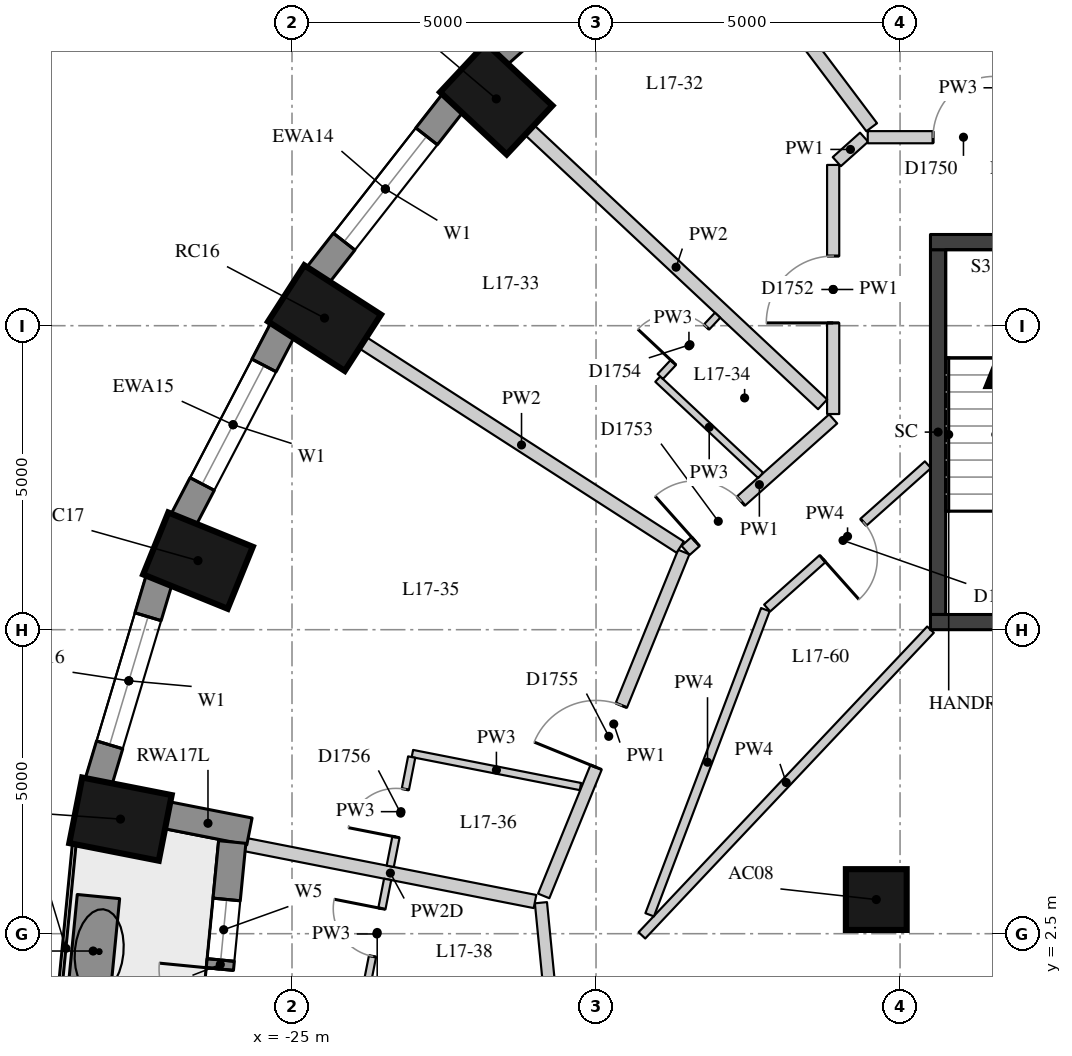
"""IFC4 building model, lengths in metres.
Left out: names, types, materials, properties, quantities, classifications, styles, units other than length and angle.
Written with IfcOpenShell. Run it as: python <this file> out.ifc"""

import sys

from ifc_helpers import new_model, si_unit, direction, frame, frame_2d, origin, origin_2d, place, context, subcontext, project, spatial, rectangle, extrude, element, fill, save


model = new_model("IFC4")
c1 = context("Model", 3, precision=1e-05, world=origin(), true_north=direction((0.0, 1.0)))
c2 = subcontext(c1, "Body", "Model", "MODEL_VIEW")
j1 = project(units=[si_unit("LENGTHUNIT", "METRE"), si_unit("PLANEANGLEUNIT", "RADIAN")], contexts=[c1])
p1 = place(None, origin())
s1 = spatial("IfcSite", under=j1, at=p1, CompositionType="ELEMENT")
p2 = place(p1, origin())
s2 = spatial("IfcBuilding", under=s1, at=p2, CompositionType="ELEMENT")
p3 = place(p2, frame((0.0, 0.0, 64.6)))
s3 = spatial("IfcBuildingStorey", under=s2, at=p3, CompositionType="ELEMENT", Elevation=64.6)
for number, where, z_axis, x_axis in (
    (1, (-21.641, 16.23, 0.0), (0.0, 0.0, 1.0), (-0.73, 0.683, 0.0)),
    (2, (-24.465, 12.625, 0.0), (0.0, 0.0, 1.0), (-0.841, 0.541, 0.0)),
    (3, (-26.546, 8.636, 0.0), (0.0, 0.0, 1.0), (-0.927, 0.376, 0.0)),
    (4, (-27.821, 4.385, 0.0), (0.0, 0.0, 1.0), (-0.981, 0.193, 0.0)),
):
    element("IfcColumn", number, at=place(p3, frame(where, z_axis=z_axis, x_axis=x_axis)), inside=s3, PredefinedType="COLUMN", context=c2, shape_type="SweptSolid", body=[
        extrude(rectangle(XDim=1.5, YDim=1.1, at=origin_2d()), origin(), (0.0, 0.0, 1.0), 3.3),
    ])
p4 = place(p3, frame((-15.391, 3.062, 0.0), z_axis=(0.0, 0.0, 1.0), x_axis=(1.0, 0.0, 0.0)))
e5 = element("IfcColumn", 5, at=p4, inside=s3, PredefinedType="COLUMN", context=c2, shape_type="SweptSolid", body=[
    extrude(rectangle(XDim=1.0, YDim=1.0, at=origin_2d()), origin(), (0.0, 0.0, 1.0), 3.3),
])
p5 = place(p3, frame((-18.871, 19.407, 0.0), z_axis=(0.0, 0.0, 1.0), x_axis=(-0.745526233716, -0.66647628228, 0.0)))
e6 = element("IfcWall", 6, at=p5, inside=s3, PredefinedType="SOLIDWALL", context=c2, shape_type="SweptSolid", body=[
    extrude(rectangle(XDim=3.697, YDim=0.45, at=frame_2d((1.848, 0.0))), origin(), (0.0, 0.0, 1.0), 3.02),
])
p6 = place(p5, frame((0.749, 0.0, 0.4)))
e7 = element("IfcOpeningElement", 7, at=p6, cuts=e6, PredefinedType="OPENING", context=c2, shape_type="SweptSolid", body=[
    extrude(rectangle(XDim=2.2, YDim=1.75, at=frame_2d((1.1, 0.875))), frame((0.0, 0.235, 0.0), z_axis=(0.0, -1.0, 0.0), x_axis=(1.0, 0.0, 0.0)), (0.0, 0.0, 1.0), 0.47),
])
p7 = place(p3, frame((-22.352, 16.17, 0.0), z_axis=(0.0, 0.0, 1.0), x_axis=(-0.616661975264, -0.787228053529, 0.0)))
e8 = element("IfcWall", 8, at=p7, inside=s3, PredefinedType="SOLIDWALL", context=c2, shape_type="SweptSolid", body=[
    extrude(rectangle(XDim=3.61, YDim=0.45, at=frame_2d((1.805, 0.0))), origin(), (0.0, 0.0, 1.0), 3.02),
])
p8 = place(p7, frame((0.705, 0.0, 0.4)))
e9 = element("IfcOpeningElement", 9, at=p8, cuts=e8, PredefinedType="OPENING", context=c2, shape_type="SweptSolid", body=[
    extrude(rectangle(XDim=2.2, YDim=1.75, at=frame_2d((1.1, 0.875))), frame((0.0, 0.235, 0.0), z_axis=(0.0, -1.0, 0.0), x_axis=(1.0, 0.0, 0.0)), (0.0, 0.0, 1.0), 0.47),
])
p9 = place(p3, frame((-25.152, 12.437, 0.0), z_axis=(0.0, 0.0, 1.0), x_axis=(-0.462492775226, -0.886623050041, 0.0)))
e10 = element("IfcWall", 10, at=p9, inside=s3, PredefinedType="SOLIDWALL", context=c2, shape_type="SweptSolid", body=[
    extrude(rectangle(XDim=3.532, YDim=0.45, at=frame_2d((1.766, 0.0))), origin(), (0.0, 0.0, 1.0), 3.02),
])
p10 = place(p9, frame((0.666, 0.0, 0.4)))
e11 = element("IfcOpeningElement", 11, at=p10, cuts=e10, PredefinedType="OPENING", context=c2, shape_type="SweptSolid", body=[
    extrude(rectangle(XDim=2.2, YDim=1.75, at=frame_2d((1.1, 0.875))), frame((0.0, 0.235, 0.0), z_axis=(0.0, -1.0, 0.0), x_axis=(1.0, 0.0, 0.0)), (0.0, 0.0, 1.0), 0.47),
])
p11 = place(p3, frame((-27.185, 8.323, 0.0), z_axis=(0.0, 0.0, 1.0), x_axis=(-0.287064133733, -0.957911364963, 0.0)))
e12 = element("IfcWall", 12, at=p11, inside=s3, PredefinedType="SOLIDWALL", context=c2, shape_type="SweptSolid", body=[
    extrude(rectangle(XDim=3.473, YDim=0.45, at=frame_2d((1.737, 0.0))), origin(), (0.0, 0.0, 1.0), 3.02),
])
p12 = place(p11, frame((0.637, 0.0, 0.4)))
e13 = element("IfcOpeningElement", 13, at=p12, cuts=e12, PredefinedType="OPENING", context=c2, shape_type="SweptSolid", body=[
    extrude(rectangle(XDim=2.2, YDim=1.75, at=frame_2d((1.1, 0.875))), frame((0.0, 0.235, 0.0), z_axis=(0.0, -1.0, 0.0), x_axis=(1.0, 0.0, 0.0)), (0.0, 0.0, 1.0), 0.47),
])
p13 = place(p3, frame((-27.064, 4.45, 0.0), z_axis=(0.0, 0.0, 1.0), x_axis=(0.98123042829, -0.192838913596, 0.0)))
e14 = element("IfcWall", 14, at=p13, inside=s3, PredefinedType="SOLIDWALL", context=c2, shape_type="SweptSolid", body=[
    extrude(rectangle(XDim=1.39, YDim=0.45, at=frame_2d((0.695, 0.0))), origin(), (0.0, 0.0, 1.0), 2.47),
])
p14 = place(p3, frame((-25.983, 4.008, 0.0), z_axis=(0.0, 0.0, 1.0), x_axis=(-0.097133468736, -0.995271364629, 0.0)))
e15 = element("IfcWall", 15, at=p14, inside=s3, PredefinedType="SOLIDWALL", context=c2, shape_type="SweptSolid", body=[
    extrude(rectangle(XDim=4.049, YDim=0.45, at=frame_2d((2.024, 0.0))), origin(), (0.0, 0.0, 1.0), 3.02),
])
p15 = place(p14, frame((0.949, 0.0, 0.4)))
e16 = element("IfcOpeningElement", 16, at=p15, cuts=e15, PredefinedType="OPENING", context=c2, shape_type="SweptSolid", body=[
    extrude(rectangle(XDim=1.0, YDim=1.75, at=frame_2d((0.5, 0.875))), frame((0.0, 0.235, 0.0), z_axis=(0.0, -1.0, 0.0), x_axis=(1.0, 0.0, 0.0)), (0.0, 0.0, 1.0), 0.47),
])
p16 = place(p14, frame((2.1, 0.0, 0.0)))
e17 = element("IfcOpeningElement", 17, at=p16, cuts=e15, PredefinedType="OPENING", context=c2, shape_type="SweptSolid", body=[
    extrude(rectangle(XDim=1.0, YDim=2.15, at=frame_2d((0.5, 1.075))), frame((0.0, 0.235, 0.0), z_axis=(0.0, -1.0, 0.0), x_axis=(1.0, 0.0, 0.0)), (0.0, 0.0, 1.0), 0.47),
])
p17 = place(p3, frame((-28.183, 3.111, 0.0), z_axis=(0.0, 0.0, 1.0), x_axis=(-0.097381768628, -0.995247100543, 0.0)))
e18 = element("IfcWall", 18, at=p17, inside=s3, PredefinedType="USERDEFINED", context=c2, shape_type="SweptSolid", body=[
    extrude(rectangle(XDim=1.8, YDim=0.7, at=frame_2d((0.9, 0.0))), origin(), (0.0, 0.0, 1.0), 0.75),
])
p18 = place(p3, frame((-14.375, 7.75, -0.28), z_axis=(0.0, 0.0, 1.0), x_axis=(0.0, 1.0, 0.0)))
e19 = element("IfcWall", 19, at=p18, inside=s3, PredefinedType="SHEAR", context=c2, shape_type="SweptSolid", body=[
    extrude(rectangle(XDim=6.0, YDim=0.25, at=frame_2d((3.0, 0.0))), origin(), (0.0, 0.0, 1.0), 3.3),
])
for number, where, z_axis, x_axis in (
    (20, (-14.5, 13.875, -0.28), (0.0, 0.0, 1.0), (1.0, 0.0, 0.0)),
    (21, (-14.5, 7.625, -0.28), (0.0, 0.0, 1.0), (1.0, 0.0, 0.0)),
):
    element("IfcWall", number, at=place(p3, frame(where, z_axis=z_axis, x_axis=x_axis)), inside=s3, PredefinedType="SHEAR", context=c2, shape_type="SweptSolid", body=[
        extrude(rectangle(XDim=5.2, YDim=0.25, at=frame_2d((2.6, 0.0))), origin(), (0.0, 0.0, 1.0), 3.3),
    ])
p19 = place(p3, frame((-20.034, -5.858, 0.0), z_axis=(0.0, 0.0, 1.0), x_axis=(-0.097894942705, 0.995196754513, 0.0)))
e22 = element("IfcWall", 22, at=p19, inside=s3, PredefinedType="PARTITIONING", context=c2, shape_type="SweptSolid", body=[
    extrude(rectangle(XDim=8.911, YDim=0.2, at=frame_2d((4.455, 0.0))), origin(), (0.0, 0.0, 1.0), 3.02),
])
p20 = place(p19, frame((5.565, 0.0, 0.0)))
e23 = element("IfcOpeningElement", 23, at=p20, cuts=e22, PredefinedType="OPENING", context=c2, shape_type="SweptSolid", body=[
    extrude(rectangle(XDim=1.1, YDim=2.1, at=frame_2d((0.55, 1.05))), frame((0.0, 0.11, 0.0), z_axis=(0.0, -1.0, 0.0), x_axis=(1.0, 0.0, 0.0)), (0.0, 0.0, 1.0), 0.22),
])
p21 = place(p19, frame((1.044, 0.0, 0.0)))
e24 = element("IfcOpeningElement", 24, at=p21, cuts=e22, PredefinedType="OPENING", context=c2, shape_type="SweptSolid", body=[
    extrude(rectangle(XDim=0.9, YDim=2.1, at=frame_2d((0.45, 1.05))), frame((0.0, 0.11, 0.0), z_axis=(0.0, -1.0, 0.0), x_axis=(1.0, 0.0, 0.0)), (0.0, 0.0, 1.0), 0.22),
])
p22 = place(p3, frame((-20.861, 3.121, 0.0), z_axis=(0.0, 0.0, 1.0), x_axis=(0.377214346955, 0.926125983034, 0.0)))
e25 = element("IfcWall", 25, at=p22, inside=s3, PredefinedType="PARTITIONING", context=c2, shape_type="SweptSolid", body=[
    extrude(rectangle(XDim=6.107, YDim=0.2, at=frame_2d((3.054, 0.0))), origin(), (0.0, 0.0, 1.0), 3.02),
])
p23 = place(p22, frame((2.285, 0.0, 0.0)))
e26 = element("IfcOpeningElement", 26, at=p23, cuts=e25, PredefinedType="OPENING", context=c2, shape_type="SweptSolid", body=[
    extrude(rectangle(XDim=1.1, YDim=2.1, at=frame_2d((0.55, 1.05))), frame((0.0, 0.11, 0.0), z_axis=(0.0, -1.0, 0.0), x_axis=(1.0, 0.0, 0.0)), (0.0, 0.0, 1.0), 0.22),
])
p24 = place(p3, frame((-18.527, 8.804, 0.0), z_axis=(0.0, 0.0, 1.0), x_axis=(0.746493000154, 0.665393267716, 0.0)))
e27 = element("IfcWall", 27, at=p24, inside=s3, PredefinedType="PARTITIONING", context=c2, shape_type="SweptSolid", body=[
    extrude(rectangle(XDim=3.251, YDim=0.2, at=frame_2d((1.625, 0.0))), origin(), (0.0, 0.0, 1.0), 3.02),
])
p25 = place(p24, frame((0.22, 0.0, 0.0)))
e28 = element("IfcOpeningElement", 28, at=p25, cuts=e27, PredefinedType="OPENING", context=c2, shape_type="SweptSolid", body=[
    extrude(rectangle(XDim=1.0, YDim=2.1, at=frame_2d((0.5, 1.05))), frame((0.0, 0.11, 0.0), z_axis=(0.0, -1.0, 0.0), x_axis=(1.0, 0.0, 0.0)), (0.0, 0.0, 1.0), 0.22),
])
p26 = place(p3, frame((-16.1, 11.047, 0.0), z_axis=(0.0, 0.0, 1.0), x_axis=(0.0, 1.0, 0.0)))
e29 = element("IfcWall", 29, at=p26, inside=s3, PredefinedType="PARTITIONING", context=c2, shape_type="SweptSolid", body=[
    extrude(rectangle(XDim=4.097, YDim=0.2, at=frame_2d((2.048, 0.0))), origin(), (0.0, 0.0, 1.0), 3.02),
])
p27 = place(p26, frame((1.499, 0.0, 0.0)))
e30 = element("IfcOpeningElement", 30, at=p27, cuts=e29, PredefinedType="OPENING", context=c2, shape_type="SweptSolid", body=[
    extrude(rectangle(XDim=1.1, YDim=2.1, at=frame_2d((0.55, 1.05))), frame((0.0, 0.11, 0.0), z_axis=(0.0, -1.0, 0.0), x_axis=(1.0, 0.0, 0.0)), (0.0, 0.0, 1.0), 0.22),
])
p28 = place(p3, frame((-16.041, 15.198, 0.0), z_axis=(0.0, 0.0, 1.0), x_axis=(0.744722115519, 0.667374685359, 0.0)))
e31 = element("IfcWall", 31, at=p28, inside=s3, PredefinedType="PARTITIONING", context=c2, shape_type="SweptSolid", body=[
    extrude(rectangle(XDim=0.603, YDim=0.2, at=frame_2d((0.301, 0.0))), origin(), (0.0, 0.0, 1.0), 3.02),
])
p29 = place(p3, frame((-15.531, 15.6, 0.0), z_axis=(0.0, 0.0, 1.0), x_axis=(1.0, 0.0, 0.0)))
e32 = element("IfcWall", 32, at=p29, inside=s3, PredefinedType="PARTITIONING", context=c2, shape_type="SweptSolid", body=[
    extrude(rectangle(XDim=4.66, YDim=0.2, at=frame_2d((2.33, 0.0))), origin(), (0.0, 0.0, 1.0), 3.02),
])
p30 = place(p29, frame((1.074, 0.0, 0.0)))
e33 = element("IfcOpeningElement", 33, at=p30, cuts=e32, PredefinedType="OPENING", context=c2, shape_type="SweptSolid", body=[
    extrude(rectangle(XDim=1.0, YDim=2.1, at=frame_2d((0.5, 1.05))), frame((0.0, 0.11, 0.0), z_axis=(0.0, -1.0, 0.0), x_axis=(1.0, 0.0, 0.0)), (0.0, 0.0, 1.0), 0.22),
])
p31 = place(p3, frame((-14.499, 7.501, 0.0), z_axis=(0.0, 0.0, 1.0), x_axis=(-0.686403699782, -0.727220709913, 0.0)))
e34 = element("IfcWall", 34, at=p31, inside=s3, PredefinedType="PARTITIONING", context=c2, shape_type="SweptSolid", body=[
    extrude(rectangle(XDim=6.915, YDim=0.15, at=frame_2d((3.457, 0.0))), origin(), (0.0, 0.0, 1.0), 3.02),
])
p32 = place(p3, frame((-19.118, 2.811, 0.0), z_axis=(0.0, 0.0, 1.0), x_axis=(0.35451573991, 0.935050046872, 0.0)))
e35 = element("IfcWall", 35, at=p32, inside=s3, PredefinedType="PARTITIONING", context=c2, shape_type="SweptSolid", body=[
    extrude(rectangle(XDim=5.367, YDim=0.15, at=frame_2d((2.684, 0.0))), origin(), (0.0, 0.0, 1.0), 3.02),
])
p33 = place(p3, frame((-17.185, 7.856, 0.0), z_axis=(0.0, 0.0, 1.0), x_axis=(0.746480516634, 0.665407272493, 0.0)))
e36 = element("IfcWall", 36, at=p33, inside=s3, PredefinedType="PARTITIONING", context=c2, shape_type="SweptSolid", body=[
    extrude(rectangle(XDim=3.541, YDim=0.15, at=frame_2d((1.771, 0.0))), origin(), (0.0, 0.0, 1.0), 3.02),
])
p34 = place(p33, frame((1.221, 0.0, 0.0)))
e37 = element("IfcOpeningElement", 37, at=p34, cuts=e36, PredefinedType="OPENING", context=c2, shape_type="SweptSolid", body=[
    extrude(rectangle(XDim=0.9, YDim=2.1, at=frame_2d((0.45, 1.05))), frame((0.0, 0.085, 0.0), z_axis=(0.0, -1.0, 0.0), x_axis=(1.0, 0.0, 0.0)), (0.0, 0.0, 1.0), 0.17),
])
p35 = place(p3, frame((-13.78, 21.201, 0.0), z_axis=(0.0, 0.0, 1.0), x_axis=(0.459699000582, -0.888074787878, 0.0)))
e38 = element("IfcWall", 38, at=p35, inside=s3, PredefinedType="PARTITIONING", context=c2, shape_type="SweptSolid", body=[
    extrude(rectangle(XDim=6.134, YDim=0.22, at=frame_2d((3.067, 0.0))), origin(), (0.0, 0.0, 1.0), 3.02),
])
p36 = place(p3, frame((-17.708, 18.743, 0.0), z_axis=(0.0, 0.0, 1.0), x_axis=(0.601172757903, -0.799119086967, 0.0)))
e39 = element("IfcWall", 39, at=p36, inside=s3, PredefinedType="PARTITIONING", context=c2, shape_type="SweptSolid", body=[
    extrude(rectangle(XDim=3.729, YDim=0.22, at=frame_2d((1.864, 0.0))), origin(), (0.0, 0.0, 1.0), 2.57),
])
p37 = place(p3, frame((-21.093, 15.718, 0.0), z_axis=(0.0, 0.0, 1.0), x_axis=(0.73009284205, -0.683347965525, 0.0)))
e40 = element("IfcWall", 40, at=p37, inside=s3, PredefinedType="PARTITIONING", context=c2, shape_type="SweptSolid", body=[
    extrude(rectangle(XDim=6.602, YDim=0.22, at=frame_2d((3.301, 0.0))), origin(), (0.0, 0.0, 1.0), 3.02),
])
p38 = place(p3, frame((-23.835, 12.219, 0.0), z_axis=(0.0, 0.0, 1.0), x_axis=(0.840743714791, -0.541433288633, 0.0)))
e41 = element("IfcWall", 41, at=p38, inside=s3, PredefinedType="PARTITIONING", context=c2, shape_type="SweptSolid", body=[
    extrude(rectangle(XDim=6.207, YDim=0.22, at=frame_2d((3.104, 0.0))), origin(), (0.0, 0.0, 1.0), 3.02),
])
p39 = place(p3, frame((-25.761, 3.964, 0.0), z_axis=(0.0, 0.0, 1.0), x_axis=(0.981216494224, -0.192909801364, 0.0)))
e42 = element("IfcWall", 42, at=p39, inside=s3, PredefinedType="PARTITIONING", context=c2, shape_type="SweptSolid", body=[
    extrude(rectangle(XDim=4.848, YDim=0.22, at=frame_2d((2.424, 0.0))), origin(), (0.0, 0.0, 1.0), 2.47),
])
p40 = place(p3, frame((-17.293, 10.038, 0.0), z_axis=(0.0, 0.0, 1.0), x_axis=(-0.730059424734, 0.683383667026, 0.0)))
e43 = element("IfcWall", 43, at=p40, inside=s3, PredefinedType="PARTITIONING", context=c2, shape_type="SweptSolid", body=[
    extrude(rectangle(XDim=2.317, YDim=0.12, at=frame_2d((1.159, 0.0))), origin(), (0.0, 0.0, 1.0), 3.02),
])
p41 = place(p3, frame((-20.257, 4.92, 0.0), z_axis=(0.0, 0.0, 1.0), x_axis=(-0.981202530622, 0.192980812261, 0.0)))
e44 = element("IfcWall", 44, at=p41, inside=s3, PredefinedType="PARTITIONING", context=c2, shape_type="SweptSolid", body=[
    extrude(rectangle(XDim=2.816, YDim=0.12, at=frame_2d((1.408, 0.0))), origin(), (0.0, 0.0, 1.0), 3.02),
])
p42 = place(p3, frame((-18.943, 11.665, 0.0), z_axis=(0.0, 0.0, 1.0), x_axis=(0.683364094355, 0.730077745549, 0.0)))
e45 = element("IfcWall", 45, at=p42, inside=s3, PredefinedType="PARTITIONING", context=c2, shape_type="SweptSolid", body=[
    extrude(rectangle(XDim=1.38, YDim=0.12, at=frame_2d((0.69, 0.0))), origin(), (0.0, 0.0, 1.0), 3.02),
])
p43 = place(p42, frame((0.315, 0.0, 0.0)))
e46 = element("IfcOpeningElement", 46, at=p43, cuts=e45, PredefinedType="OPENING", context=c2, shape_type="SweptSolid", body=[
    extrude(rectangle(XDim=0.8, YDim=2.1, at=frame_2d((0.4, 1.05))), frame((0.0, 0.07, 0.0), z_axis=(0.0, -1.0, 0.0), x_axis=(1.0, 0.0, 0.0)), (0.0, 0.0, 1.0), 0.14),
])
p44 = place(p3, frame((-23.032, 5.405, 0.0), z_axis=(0.0, 0.0, 1.0), x_axis=(-0.19288291118, -0.981221780524, 0.0)))
e47 = element("IfcWall", 47, at=p44, inside=s3, PredefinedType="PARTITIONING", context=c2, shape_type="SweptSolid", body=[
    extrude(rectangle(XDim=1.83, YDim=0.12, at=frame_2d((0.915, 0.0))), origin(), (0.0, 0.0, 1.0), 3.02),
])
p45 = place(p44, frame((0.54, 0.0, 0.0)))
e48 = element("IfcOpeningElement", 48, at=p45, cuts=e47, PredefinedType="OPENING", context=c2, shape_type="SweptSolid", body=[
    extrude(rectangle(XDim=0.8, YDim=2.1, at=frame_2d((0.4, 1.05))), frame((0.0, 0.07, 0.0), z_axis=(0.0, -1.0, 0.0), x_axis=(1.0, 0.0, 0.0)), (0.0, 0.0, 1.0), 0.14),
])
p46 = place(p3, frame((-23.781, 1.598, 0.0), z_axis=(0.0, 0.0, 1.0), x_axis=(0.193036598643, 0.981191557029, 0.0)))
e49 = element("IfcWall", 49, at=p46, inside=s3, PredefinedType="PARTITIONING", context=c2, shape_type="SweptSolid", body=[
    extrude(rectangle(XDim=1.83, YDim=0.12, at=frame_2d((0.915, 0.0))), origin(), (0.0, 0.0, 1.0), 3.02),
])
p47 = place(p46, frame((0.54, 0.0, 0.0)))
e50 = element("IfcOpeningElement", 50, at=p47, cuts=e49, PredefinedType="OPENING", context=c2, shape_type="SweptSolid", body=[
    extrude(rectangle(XDim=0.8, YDim=2.1, at=frame_2d((0.4, 1.05))), frame((0.0, 0.07, 0.0), z_axis=(0.0, -1.0, 0.0), x_axis=(1.0, 0.0, 0.0)), (0.0, 0.0, 1.0), 0.14),
])
p48 = place(p3, frame((-13.554, 0.0, 0.0), z_axis=(0.0, 0.0, 1.0), x_axis=(0.382730523909, 0.923860025149, 0.0)))
e51 = element("IfcWall", 51, at=p48, inside=s3, PredefinedType="PARTITIONING", context=c2, shape_type="SweptSolid", body=[
    extrude(rectangle(XDim=4.251, YDim=0.1, at=frame_2d((2.125, 0.0))), origin(), (0.0, 0.0, 1.0), 3.02),
])
p49 = place(p8, origin())
e52 = element("IfcWindow", 52, at=p49, inside=s3, PartitioningType="SINGLE_PANEL", PredefinedType="WINDOW", context=c2, shape_type="SweptSolid", body=[
    extrude(rectangle(XDim=2.2, YDim=1.75, at=frame_2d((1.1, 0.875))), frame((0.0, 0.035, 0.0), z_axis=(0.0, -1.0, 0.0), x_axis=(1.0, 0.0, 0.0)), (0.0, 0.0, 1.0), 0.06),
])
fill(e9, e52)
p50 = place(p10, origin())
e53 = element("IfcWindow", 53, at=p50, inside=s3, PartitioningType="SINGLE_PANEL", PredefinedType="WINDOW", context=c2, shape_type="SweptSolid", body=[
    extrude(rectangle(XDim=2.2, YDim=1.75, at=frame_2d((1.1, 0.875))), frame((0.0, 0.035, 0.0), z_axis=(0.0, -1.0, 0.0), x_axis=(1.0, 0.0, 0.0)), (0.0, 0.0, 1.0), 0.06),
])
fill(e11, e53)
p51 = place(p12, origin())
e54 = element("IfcWindow", 54, at=p51, inside=s3, PartitioningType="SINGLE_PANEL", PredefinedType="WINDOW", context=c2, shape_type="SweptSolid", body=[
    extrude(rectangle(XDim=2.2, YDim=1.75, at=frame_2d((1.1, 0.875))), frame((0.0, 0.035, 0.0), z_axis=(0.0, -1.0, 0.0), x_axis=(1.0, 0.0, 0.0)), (0.0, 0.0, 1.0), 0.06),
])
fill(e13, e54)
p52 = place(p15, origin())
e55 = element("IfcWindow", 55, at=p52, inside=s3, PartitioningType="SINGLE_PANEL", PredefinedType="WINDOW", context=c2, shape_type="SweptSolid", body=[
    extrude(rectangle(XDim=1.0, YDim=1.75, at=frame_2d((0.5, 0.875))), frame((0.0, 0.035, 0.0), z_axis=(0.0, -1.0, 0.0), x_axis=(1.0, 0.0, 0.0)), (0.0, 0.0, 1.0), 0.06),
])
fill(e16, e55)
p53 = place(p16, frame((1.0, 0.0, 0.0), z_axis=(0.0, 0.0, 1.0), x_axis=(-1.0, 0.0, 0.0)))
e56 = element("IfcDoor", 56, at=p53, inside=s3, OperationType="SINGLE_SWING_RIGHT", PredefinedType="DOOR", context=c2, shape_type="SweptSolid", body=[
    extrude(rectangle(XDim=1.0, YDim=2.15, at=frame_2d((0.5, 1.075))), frame((0.0, 0.075, 0.0), z_axis=(0.0, -1.0, 0.0), x_axis=(1.0, 0.0, 0.0)), (0.0, 0.0, 1.0), 0.05),
])
fill(e17, e56)
p54 = place(p30, origin())
e57 = element("IfcDoor", 57, at=p54, inside=s3, OperationType="SINGLE_SWING_RIGHT", PredefinedType="DOOR", context=c2, shape_type="SweptSolid", body=[
    extrude(rectangle(XDim=1.0, YDim=2.1, at=frame_2d((0.5, 1.05))), frame((0.0, 0.025, 0.0), z_axis=(0.0, -1.0, 0.0), x_axis=(1.0, 0.0, 0.0)), (0.0, 0.0, 1.0), 0.05),
])
fill(e33, e57)
p55 = place(p27, origin())
e58 = element("IfcDoor", 58, at=p55, inside=s3, OperationType="SINGLE_SWING_LEFT", PredefinedType="DOOR", context=c2, shape_type="SweptSolid", body=[
    extrude(rectangle(XDim=1.1, YDim=2.1, at=frame_2d((0.55, 1.05))), frame((0.0, 0.025, 0.0), z_axis=(0.0, -1.0, 0.0), x_axis=(1.0, 0.0, 0.0)), (0.0, 0.0, 1.0), 0.05),
])
fill(e30, e58)
p56 = place(p25, origin())
e59 = element("IfcDoor", 59, at=p56, inside=s3, OperationType="SINGLE_SWING_LEFT", PredefinedType="DOOR", context=c2, shape_type="SweptSolid", body=[
    extrude(rectangle(XDim=1.0, YDim=2.1, at=frame_2d((0.5, 1.05))), frame((0.0, 0.025, 0.0), z_axis=(0.0, -1.0, 0.0), x_axis=(1.0, 0.0, 0.0)), (0.0, 0.0, 1.0), 0.05),
])
fill(e28, e59)
p57 = place(p43, origin())
e60 = element("IfcDoor", 60, at=p57, inside=s3, OperationType="SINGLE_SWING_LEFT", PredefinedType="DOOR", context=c2, shape_type="SweptSolid", body=[
    extrude(rectangle(XDim=0.8, YDim=2.1, at=frame_2d((0.4, 1.05))), frame((0.0, 0.025, 0.0), z_axis=(0.0, -1.0, 0.0), x_axis=(1.0, 0.0, 0.0)), (0.0, 0.0, 1.0), 0.05),
])
fill(e46, e60)
p58 = place(p23, origin())
e61 = element("IfcDoor", 61, at=p58, inside=s3, OperationType="SINGLE_SWING_LEFT", PredefinedType="DOOR", context=c2, shape_type="SweptSolid", body=[
    extrude(rectangle(XDim=1.1, YDim=2.1, at=frame_2d((0.55, 1.05))), frame((0.0, 0.025, 0.0), z_axis=(0.0, -1.0, 0.0), x_axis=(1.0, 0.0, 0.0)), (0.0, 0.0, 1.0), 0.05),
])
fill(e26, e61)
p59 = place(p45, origin())
e62 = element("IfcDoor", 62, at=p59, inside=s3, OperationType="SINGLE_SWING_LEFT", PredefinedType="DOOR", context=c2, shape_type="SweptSolid", body=[
    extrude(rectangle(XDim=0.8, YDim=2.1, at=frame_2d((0.4, 1.05))), frame((0.0, 0.025, 0.0), z_axis=(0.0, -1.0, 0.0), x_axis=(1.0, 0.0, 0.0)), (0.0, 0.0, 1.0), 0.05),
])
fill(e48, e62)
p60 = place(p47, origin())
e63 = element("IfcDoor", 63, at=p60, inside=s3, OperationType="SINGLE_SWING_RIGHT", PredefinedType="DOOR", context=c2, shape_type="SweptSolid", body=[
    extrude(rectangle(XDim=0.8, YDim=2.1, at=frame_2d((0.4, 1.05))), frame((0.0, 0.025, 0.0), z_axis=(0.0, -1.0, 0.0), x_axis=(1.0, 0.0, 0.0)), (0.0, 0.0, 1.0), 0.05),
])
fill(e50, e63)
p61 = place(p34, origin())
e64 = element("IfcDoor", 64, at=p61, inside=s3, OperationType="SINGLE_SWING_RIGHT", PredefinedType="DOOR", context=c2, shape_type="SweptSolid", body=[
    extrude(rectangle(XDim=0.9, YDim=2.1, at=frame_2d((0.45, 1.05))), frame((0.0, 0.025, 0.0), z_axis=(0.0, -1.0, 0.0), x_axis=(1.0, 0.0, 0.0)), (0.0, 0.0, 1.0), 0.05),
])
fill(e37, e64)
save(model, sys.argv[1])
